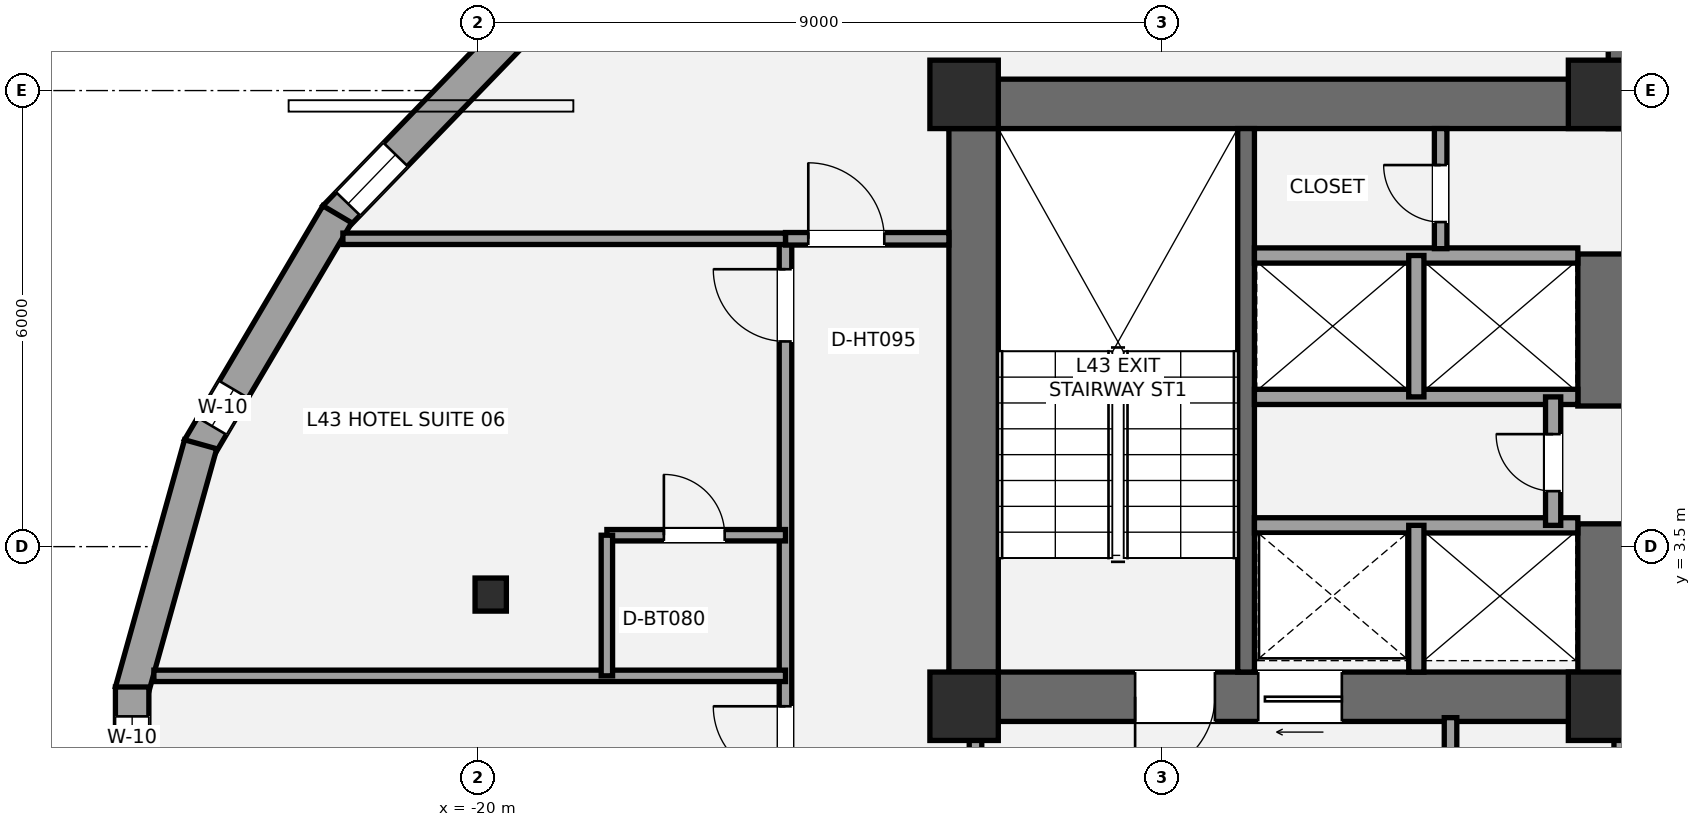
"""IFC4 building model, lengths in metres.
Left out: names, types, materials, properties, quantities, classifications, styles, units other than length and angle.
Written with IfcOpenShell. Run it as: python <this file> out.ifc"""

import sys

from ifc_helpers import new_model, si_unit, direction, frame, frame_2d, origin, origin_2d, place, context, subcontext, project, spatial, rectangle, i_section, extrude, element, fill, save


model = new_model("IFC4")
c1 = context("Model", 3, precision=1e-05, world=origin(), true_north=direction((0.0, 1.0)))
c2 = subcontext(c1, "Body", "Model", "MODEL_VIEW")
j1 = project(units=[si_unit("LENGTHUNIT", "METRE"), si_unit("PLANEANGLEUNIT", "RADIAN")], contexts=[c1])
p1 = place(None, origin())
s1 = spatial("IfcSite", under=j1, at=p1, CompositionType="ELEMENT")
p2 = place(p1, origin())
s2 = spatial("IfcBuilding", under=s1, at=p2, CompositionType="ELEMENT")
p3 = place(p2, frame((0.0, 0.0, 159.8)))
s3 = spatial("IfcBuildingStorey", under=s2, at=p3, CompositionType="ELEMENT", Elevation=159.8)
p4 = place(p3, frame((-13.475, 1.2, 0.0), z_axis=(0.0, 0.0, 1.0), x_axis=(0.0, 1.0, 0.0)))
e1 = element("IfcWall", 1, at=p4, inside=s3, PredefinedType="SHEAR", context=c2, shape_type="SweptSolid", body=[
    extrude(rectangle(XDim=8.45, YDim=0.65, at=frame_2d((4.225, 0.0))), origin(), (0.0, 0.0, 1.0), 3.2),
])
p5 = place(p3, frame((-13.8, 9.325, 0.0), z_axis=(0.0, 0.0, 1.0), x_axis=(1.0, 0.0, 0.0)))
e2 = element("IfcWall", 2, at=p5, inside=s3, PredefinedType="SHEAR", context=c2, shape_type="SweptSolid", body=[
    extrude(rectangle(XDim=9.325, YDim=0.65, at=frame_2d((4.663, 0.0))), origin(), (0.0, 0.0, 1.0), 3.2),
])
p6 = place(p3, frame((-4.875, 1.525, 0.0), z_axis=(0.0, 0.0, 1.0), x_axis=(-1.0, 0.0, 0.0)))
e3 = element("IfcWall", 3, at=p6, inside=s3, PredefinedType="SHEAR", context=c2, shape_type="SweptSolid", body=[
    extrude(rectangle(XDim=8.925, YDim=0.65, at=frame_2d((4.462, 0.0))), origin(), (0.0, 0.0, 1.0), 3.2),
])
p7 = place(p6, frame((5.425, 0.0, 0.0)))
e4 = element("IfcOpeningElement", 4, at=p7, cuts=e3, PredefinedType="OPENING", context=c2, shape_type="SweptSolid", body=[
    extrude(rectangle(XDim=1.05, YDim=2.15, at=frame_2d((0.525, 1.075))), frame((0.0, 0.335, 0.0), z_axis=(0.0, -1.0, 0.0), x_axis=(1.0, 0.0, 0.0)), (0.0, 0.0, 1.0), 0.67),
])
p8 = place(p6, frame((3.755, 0.0, 0.0)))
e5 = element("IfcOpeningElement", 5, at=p8, cuts=e3, PredefinedType="OPENING", context=c2, shape_type="SweptSolid", body=[
    extrude(rectangle(XDim=1.1, YDim=2.2, at=frame_2d((0.55, 1.1))), frame((0.0, 0.335, 0.0), z_axis=(0.0, -1.0, 0.0), x_axis=(1.0, 0.0, 0.0)), (0.0, 0.0, 1.0), 0.67),
])
p9 = place(p3, frame((-5.2, 1.2, 0.0), z_axis=(0.0, 0.0, 1.0), x_axis=(0.0, 1.0, 0.0)))
e6 = element("IfcWall", 6, at=p9, inside=s3, PredefinedType="SHEAR", context=c2, shape_type="SweptSolid", body=[
    extrude(rectangle(XDim=2.6, YDim=0.65, at=frame_2d((1.3, 0.0))), origin(), (0.0, 0.0, 1.0), 3.2),
])
p10 = place(p3, frame((-5.2, 5.35, 0.0), z_axis=(0.0, 0.0, 1.0), x_axis=(0.0, 1.0, 0.0)))
e7 = element("IfcWall", 7, at=p10, inside=s3, PredefinedType="SHEAR", context=c2, shape_type="SweptSolid", body=[
    extrude(rectangle(XDim=2.0, YDim=0.65, at=frame_2d((1.0, 0.0))), origin(), (0.0, 0.0, 1.0), 3.2),
])
p11 = place(p3, frame((-9.89, 1.85, 0.0), z_axis=(0.0, 0.0, 1.0), x_axis=(0.0, 1.0, 0.0)))
e8 = element("IfcWall", 8, at=p11, inside=s3, PredefinedType="SHEAR", context=c2, shape_type="SweptSolid", body=[
    extrude(rectangle(XDim=7.15, YDim=0.22, at=frame_2d((3.575, 0.0))), origin(), (0.0, 0.0, 1.0), 3.2),
])
p12 = place(p3, frame((-4.8, 9.0, 0.0), z_axis=(0.0, 0.0, 1.0), x_axis=(0.0, 1.0, 0.0)))
e9 = element("IfcWall", 9, at=p12, inside=s3, PredefinedType="SHEAR", context=c2, shape_type="SweptSolid", body=[
    extrude(rectangle(XDim=4.05, YDim=0.65, at=frame_2d((2.025, 0.0))), origin(), (0.0, 0.0, 1.0), 3.2),
])
for number, where, z_axis, x_axis in (
    (10, (-13.6, 1.4, 0.0), (0.0, 0.0, 1.0), (1.0, 0.0, 0.0)),
    (11, (-13.6, 9.45, 0.0), (0.0, 0.0, 1.0), (1.0, 0.0, 0.0)),
    (12, (-5.2, 1.4, 0.0), (0.0, 0.0, 1.0), (1.0, 0.0, 0.0)),
    (13, (-5.2, 9.45, 0.0), (0.0, 0.0, 1.0), (1.0, 0.0, 0.0)),
):
    element("IfcColumn", number, at=place(p3, frame(where, z_axis=z_axis, x_axis=x_axis)), inside=s3, PredefinedType="COLUMN", context=c2, shape_type="SweptSolid", body=[
        extrude(rectangle(XDim=0.9, YDim=0.9, at=origin_2d()), origin(), (0.0, 0.0, 1.0), 3.2),
    ])
p13 = place(p3, frame((-19.828, 2.869, 0.0), z_axis=(0.0, 0.0, 1.0), x_axis=(1.0, 0.0, 0.0)))
e14 = element("IfcColumn", 14, at=p13, inside=s3, PredefinedType="COLUMN", context=c2, shape_type="SweptSolid", body=[
    extrude(i_section(OverallWidth=0.412, OverallDepth=0.435, WebThickness=0.036, FlangeThickness=0.057, at=origin_2d()), origin(), (0.0, 0.0, 1.0), 3.2),
])
p14 = place(p3, frame((-21.879, 7.832, 0.0), z_axis=(0.0, 0.0, 1.0), x_axis=(0.694975307772, 0.719033602544, 0.0)))
e15 = element("IfcWall", 15, at=p14, inside=s3, PredefinedType="STANDARD", context=c2, shape_type="SweptSolid", body=[
    extrude(rectangle(XDim=3.866, YDim=0.44, at=frame_2d((1.933, 0.0))), origin(), (0.0, 0.0, 1.0), 2.315),
])
p15 = place(p14, frame((0.25, 0.0, 0.42)))
e16 = element("IfcOpeningElement", 16, at=p15, cuts=e15, PredefinedType="OPENING", context=c2, shape_type="SweptSolid", body=[
    extrude(rectangle(XDim=0.9, YDim=1.35, at=frame_2d((0.45, 0.675))), frame((0.0, 0.23, 0.0), z_axis=(0.0, -1.0, 0.0), x_axis=(1.0, 0.0, 0.0)), (0.0, 0.0, 1.0), 0.46),
])
p16 = place(p3, frame((-23.667, 4.794, 0.0), z_axis=(0.0, 0.0, 1.0), x_axis=(0.508883387051, 0.860835465338, 0.0)))
e17 = element("IfcWall", 17, at=p16, inside=s3, PredefinedType="STANDARD", context=c2, shape_type="SweptSolid", body=[
    extrude(rectangle(XDim=3.577, YDim=0.44, at=frame_2d((1.788, 0.0))), origin(), (0.0, 0.0, 1.0), 2.315),
])
p17 = place(p16, frame((0.339, 0.0, 0.58)))
e18 = element("IfcOpeningElement", 18, at=p17, cuts=e17, PredefinedType="OPENING", context=c2, shape_type="SweptSolid", body=[
    extrude(rectangle(XDim=0.56, YDim=1.15, at=frame_2d((0.28, 0.575))), frame((0.0, 0.23, 0.0), z_axis=(0.0, -1.0, 0.0), x_axis=(1.0, 0.0, 0.0)), (0.0, 0.0, 1.0), 0.46),
])
p18 = place(p3, frame((-24.554, 1.594, 0.0), z_axis=(0.0, 0.0, 1.0), x_axis=(0.269235699479, 0.963074315993, 0.0)))
e19 = element("IfcWall", 19, at=p18, inside=s3, PredefinedType="STANDARD", context=c2, shape_type="SweptSolid", body=[
    extrude(rectangle(XDim=3.377, YDim=0.44, at=frame_2d((1.688, 0.0))), origin(), (0.0, 0.0, 1.0), 2.315),
])
p19 = place(p3, frame((-24.546, -1.654, 0.0), z_axis=(0.0, 0.0, 1.0), x_axis=(0.0, 1.0, 0.0)))
e20 = element("IfcWall", 20, at=p19, inside=s3, PredefinedType="STANDARD", context=c2, shape_type="SweptSolid", body=[
    extrude(rectangle(XDim=3.307, YDim=0.44, at=frame_2d((1.654, 0.0))), origin(), (0.0, 0.0, 1.0), 2.315),
])
p20 = place(p19, frame((2.36, 0.0, 0.58)))
e21 = element("IfcOpeningElement", 21, at=p20, cuts=e20, PredefinedType="OPENING", context=c2, shape_type="SweptSolid", body=[
    extrude(rectangle(XDim=0.56, YDim=1.15, at=frame_2d((0.28, 0.575))), frame((0.0, 0.23, 0.0), z_axis=(0.0, -1.0, 0.0), x_axis=(1.0, 0.0, 0.0)), (0.0, 0.0, 1.0), 0.46),
])
p21 = place(p3, frame((-13.45, -2.15, 0.0), z_axis=(0.0, 0.0, 1.0), x_axis=(0.0, 1.0, 0.0)))
e22 = element("IfcWall", 22, at=p21, inside=s3, PredefinedType="PARTITIONING", context=c2, shape_type="SweptSolid", body=[
    extrude(rectangle(XDim=3.4, YDim=0.165, at=frame_2d((1.7, 0.0))), origin(), (0.0, 0.0, 1.0), 2.473),
])
p22 = place(p21, frame((1.15, 0.0, 0.0)))
e23 = element("IfcOpeningElement", 23, at=p22, cuts=e22, PredefinedType="OPENING", context=c2, shape_type="SweptSolid", body=[
    extrude(rectangle(XDim=1.05, YDim=2.15, at=frame_2d((0.525, 1.075))), frame((0.0, 0.093, 0.0), z_axis=(0.0, -1.0, 0.0), x_axis=(1.0, 0.0, 0.0)), (0.0, 0.0, 1.0), 0.185),
])
p23 = place(p3, frame((-7.2, -2.15, 0.0), z_axis=(0.0, 0.0, 1.0), x_axis=(0.0, 1.0, 0.0)))
e24 = element("IfcWall", 24, at=p23, inside=s3, PredefinedType="PARTITIONING", context=c2, shape_type="SweptSolid", body=[
    extrude(rectangle(XDim=3.4, YDim=0.165, at=frame_2d((1.7, 0.0))), origin(), (0.0, 0.0, 1.0), 2.473),
])
p24 = place(p3, frame((-4.95, -2.15, 0.0), z_axis=(0.0, 0.0, 1.0), x_axis=(0.0, 1.0, 0.0)))
e25 = element("IfcWall", 25, at=p24, inside=s3, PredefinedType="SOLIDWALL", context=c2, shape_type="SweptSolid", body=[
    extrude(rectangle(XDim=3.4, YDim=0.2, at=frame_2d((1.7, 0.0))), origin(), (0.0, 0.0, 1.0), 2.473),
])
p25 = place(p24, frame((0.95, 0.0, 0.0)))
e26 = element("IfcOpeningElement", 26, at=p25, cuts=e25, PredefinedType="OPENING", context=c2, shape_type="SweptSolid", body=[
    extrude(rectangle(XDim=0.75, YDim=2.1, at=frame_2d((0.375, 1.05))), frame((0.0, 0.11, 0.0), z_axis=(0.0, -1.0, 0.0), x_axis=(1.0, 0.0, 0.0)), (0.0, 0.0, 1.0), 0.22),
])
p26 = place(p3, frame((-9.78, 3.78, 0.0), z_axis=(0.0, 0.0, 1.0), x_axis=(1.0, 0.0, 0.0)))
e27 = element("IfcWall", 27, at=p26, inside=s3, PredefinedType="SOLIDWALL", context=c2, shape_type="SweptSolid", body=[
    extrude(rectangle(XDim=4.255, YDim=0.2, at=frame_2d((2.127, 0.0))), origin(), (0.0, 0.0, 1.0), 3.02),
])
p27 = place(p3, frame((-7.65, 1.85, 0.0), z_axis=(0.0, 0.0, 1.0), x_axis=(0.0, 1.0, 0.0)))
e28 = element("IfcWall", 28, at=p27, inside=s3, PredefinedType="SOLIDWALL", context=c2, shape_type="SweptSolid", body=[
    extrude(rectangle(XDim=1.93, YDim=0.2, at=frame_2d((0.965, 0.0))), origin(), (0.0, 0.0, 1.0), 3.02),
])
for number, where, z_axis, x_axis in (
    (29, (-9.78, 5.47, 0.0), (0.0, 0.0, 1.0), (1.0, 0.0, 0.0)),
    (30, (-9.78, 7.33, 0.0), (0.0, 0.0, 1.0), (1.0, 0.0, 0.0)),
):
    element("IfcWall", number, at=place(p3, frame(where, z_axis=z_axis, x_axis=x_axis)), inside=s3, PredefinedType="SOLIDWALL", context=c2, shape_type="SweptSolid", body=[
        extrude(rectangle(XDim=4.255, YDim=0.2, at=frame_2d((2.127, 0.0))), origin(), (0.0, 0.0, 1.0), 3.02),
    ])
p28 = place(p3, frame((-7.65, 5.47, 0.0), z_axis=(0.0, 0.0, 1.0), x_axis=(0.0, 1.0, 0.0)))
e31 = element("IfcWall", 31, at=p28, inside=s3, PredefinedType="SOLIDWALL", context=c2, shape_type="SweptSolid", body=[
    extrude(rectangle(XDim=1.86, YDim=0.2, at=frame_2d((0.93, 0.0))), origin(), (0.0, 0.0, 1.0), 3.02),
])
p29 = place(p3, frame((-5.85, 3.78, 0.0), z_axis=(0.0, 0.0, 1.0), x_axis=(0.0, 1.0, 0.0)))
e32 = element("IfcWall", 32, at=p29, inside=s3, PredefinedType="SOLIDWALL", context=c2, shape_type="SweptSolid", body=[
    extrude(rectangle(XDim=1.69, YDim=0.2, at=frame_2d((0.845, 0.0))), origin(), (0.0, 0.0, 1.0), 3.02),
])
p30 = place(p29, frame((0.45, 0.0, 0.0)))
e33 = element("IfcOpeningElement", 33, at=p30, cuts=e32, PredefinedType="OPENING", context=c2, shape_type="SweptSolid", body=[
    extrude(rectangle(XDim=0.75, YDim=2.1, at=frame_2d((0.375, 1.05))), frame((0.0, 0.11, 0.0), z_axis=(0.0, -1.0, 0.0), x_axis=(1.0, 0.0, 0.0)), (0.0, 0.0, 1.0), 0.22),
])
p31 = place(p3, frame((-7.33, 7.42, 0.0), z_axis=(0.0, 0.0, 1.0), x_axis=(0.0, 1.0, 0.0)))
e34 = element("IfcWall", 34, at=p31, inside=s3, PredefinedType="PARTITIONING", context=c2, shape_type="SweptSolid", body=[
    extrude(rectangle(XDim=1.58, YDim=0.165, at=frame_2d((0.79, 0.0))), origin(), (0.0, 0.0, 1.0), 3.02),
])
p32 = place(p31, frame((0.35, 0.0, 0.0)))
e35 = element("IfcOpeningElement", 35, at=p32, cuts=e34, PredefinedType="OPENING", context=c2, shape_type="SweptSolid", body=[
    extrude(rectangle(XDim=0.75, YDim=2.1, at=frame_2d((0.375, 1.05))), frame((0.0, 0.093, 0.0), z_axis=(0.0, -1.0, 0.0), x_axis=(1.0, 0.0, 0.0)), (0.0, 0.0, 1.0), 0.185),
])
p33 = place(p3, frame((-15.95, -12.528, 0.0), z_axis=(0.0, 0.0, 1.0), x_axis=(0.0, 1.0, 0.0)))
e36 = element("IfcWall", 36, at=p33, inside=s3, PredefinedType="PARTITIONING", context=c2, shape_type="SweptSolid", body=[
    extrude(rectangle(XDim=20.078, YDim=0.165, at=frame_2d((10.039, 0.0))), origin(), (0.0, 0.0, 1.0), 2.473),
])
p34 = place(p33, frame((5.528, 0.0, 0.0)))
e37 = element("IfcOpeningElement", 37, at=p34, cuts=e36, PredefinedType="OPENING", context=c2, shape_type="SweptSolid", body=[
    extrude(rectangle(XDim=0.85, YDim=2.1, at=frame_2d((0.425, 1.05))), frame((0.0, 0.093, 0.0), z_axis=(0.0, -1.0, 0.0), x_axis=(1.0, 0.0, 0.0)), (0.0, 0.0, 1.0), 0.185),
])
p35 = place(p33, frame((12.978, 0.0, 0.0)))
e38 = element("IfcOpeningElement", 38, at=p35, cuts=e36, PredefinedType="OPENING", context=c2, shape_type="SweptSolid", body=[
    extrude(rectangle(XDim=0.95, YDim=2.15, at=frame_2d((0.475, 1.075))), frame((0.0, 0.093, 0.0), z_axis=(0.0, -1.0, 0.0), x_axis=(1.0, 0.0, 0.0)), (0.0, 0.0, 1.0), 0.185),
])
p36 = place(p33, frame((18.728, 0.0, 0.0)))
e39 = element("IfcOpeningElement", 39, at=p36, cuts=e36, PredefinedType="OPENING", context=c2, shape_type="SweptSolid", body=[
    extrude(rectangle(XDim=0.95, YDim=2.15, at=frame_2d((0.475, 1.075))), frame((0.0, 0.093, 0.0), z_axis=(0.0, -1.0, 0.0), x_axis=(1.0, 0.0, 0.0)), (0.0, 0.0, 1.0), 0.185),
])
p37 = place(p3, frame((-15.95, 7.55, 0.0), z_axis=(0.0, 0.0, 1.0), x_axis=(1.0, 0.0, 0.0)))
e40 = element("IfcWall", 40, at=p37, inside=s3, PredefinedType="PARTITIONING", context=c2, shape_type="SweptSolid", body=[
    extrude(rectangle(XDim=2.15, YDim=0.165, at=frame_2d((1.075, 0.0))), origin(), (0.0, 0.0, 1.0), 3.02),
])
p38 = place(p37, frame((0.3, 0.0, 0.0)))
e41 = element("IfcOpeningElement", 41, at=p38, cuts=e40, PredefinedType="OPENING", context=c2, shape_type="SweptSolid", body=[
    extrude(rectangle(XDim=1.0, YDim=2.15, at=frame_2d((0.5, 1.075))), frame((0.0, 0.093, 0.0), z_axis=(0.0, -1.0, 0.0), x_axis=(1.0, 0.0, 0.0)), (0.0, 0.0, 1.0), 0.185),
])
p39 = place(p3, frame((-21.773, 7.55, 0.0), z_axis=(0.0, 0.0, 1.0), x_axis=(1.0, 0.0, 0.0)))
e42 = element("IfcWall", 42, at=p39, inside=s3, PredefinedType="PLUMBINGWALL", context=c2, shape_type="SweptSolid", body=[
    extrude(rectangle(XDim=5.823, YDim=0.15, at=frame_2d((2.912, 0.0))), origin(), (0.0, 0.0, 1.0), 2.473),
])
p40 = place(p3, frame((-24.26, 1.8, 0.0), z_axis=(0.0, 0.0, 1.0), x_axis=(1.0, 0.0, 0.0)))
e43 = element("IfcWall", 43, at=p40, inside=s3, PredefinedType="PLUMBINGWALL", context=c2, shape_type="SweptSolid", body=[
    extrude(rectangle(XDim=8.31, YDim=0.15, at=frame_2d((4.155, 0.0))), origin(), (0.0, 0.0, 1.0), 2.473),
])
p41 = place(p3, frame((-18.3, 3.65, 0.0), z_axis=(0.0, 0.0, 1.0), x_axis=(1.0, 0.0, 0.0)))
e44 = element("IfcWall", 44, at=p41, inside=s3, PredefinedType="PLUMBINGWALL", context=c2, shape_type="SweptSolid", body=[
    extrude(rectangle(XDim=2.35, YDim=0.15, at=frame_2d((1.175, 0.0))), origin(), (0.0, 0.0, 1.0), 3.02),
])
p42 = place(p41, frame((0.75, 0.0, 0.0)))
e45 = element("IfcOpeningElement", 45, at=p42, cuts=e44, PredefinedType="OPENING", context=c2, shape_type="SweptSolid", body=[
    extrude(rectangle(XDim=0.8, YDim=2.1, at=frame_2d((0.4, 1.05))), frame((0.0, 0.085, 0.0), z_axis=(0.0, -1.0, 0.0), x_axis=(1.0, 0.0, 0.0)), (0.0, 0.0, 1.0), 0.17),
])
p43 = place(p3, frame((-18.3, 1.8, 0.0), z_axis=(0.0, 0.0, 1.0), x_axis=(0.0, 1.0, 0.0)))
e46 = element("IfcWall", 46, at=p43, inside=s3, PredefinedType="PLUMBINGWALL", context=c2, shape_type="SweptSolid", body=[
    extrude(rectangle(XDim=1.85, YDim=0.15, at=frame_2d((0.925, 0.0))), origin(), (0.0, 0.0, 1.0), 3.02),
])
p44 = place(p15, origin())
e47 = element("IfcWindow", 47, at=p44, inside=s3, PartitioningType="SINGLE_PANEL", PredefinedType="WINDOW", context=c2, shape_type="SweptSolid", body=[
    extrude(rectangle(XDim=0.9, YDim=1.35, at=frame_2d((0.45, 0.675))), frame((0.0, -0.01, 0.0), z_axis=(0.0, -1.0, 0.0), x_axis=(1.0, 0.0, 0.0)), (0.0, 0.0, 1.0), 0.06),
])
fill(e16, e47)
p45 = place(p20, origin())
e48 = element("IfcWindow", 48, at=p45, inside=s3, PartitioningType="SINGLE_PANEL", PredefinedType="WINDOW", context=c2, shape_type="SweptSolid", body=[
    extrude(rectangle(XDim=0.56, YDim=1.15, at=frame_2d((0.28, 0.575))), frame((0.0, -0.01, 0.0), z_axis=(0.0, -1.0, 0.0), x_axis=(1.0, 0.0, 0.0)), (0.0, 0.0, 1.0), 0.06),
])
fill(e21, e48)
p46 = place(p17, origin())
e49 = element("IfcWindow", 49, at=p46, inside=s3, PartitioningType="SINGLE_PANEL", PredefinedType="WINDOW", context=c2, shape_type="SweptSolid", body=[
    extrude(rectangle(XDim=0.56, YDim=1.15, at=frame_2d((0.28, 0.575))), frame((0.0, -0.01, 0.0), z_axis=(0.0, -1.0, 0.0), x_axis=(1.0, 0.0, 0.0)), (0.0, 0.0, 1.0), 0.06),
])
fill(e18, e49)
p47 = place(p7, origin())
e50 = element("IfcDoor", 50, at=p47, inside=s3, OperationType="SINGLE_SWING_RIGHT", PredefinedType="DOOR", context=c2, shape_type="SweptSolid", body=[
    extrude(rectangle(XDim=1.05, YDim=2.15, at=frame_2d((0.525, 1.075))), frame((0.0, 0.025, 0.0), z_axis=(0.0, -1.0, 0.0), x_axis=(1.0, 0.0, 0.0)), (0.0, 0.0, 1.0), 0.05),
])
fill(e4, e50)
p48 = place(p8, origin())
e51 = element("IfcDoor", 51, at=p48, inside=s3, OperationType="SLIDING_TO_LEFT", PredefinedType="DOOR", context=c2, shape_type="SweptSolid", body=[
    extrude(rectangle(XDim=1.1, YDim=2.2, at=frame_2d((0.55, 1.1))), frame((0.0, 0.025, 0.0), z_axis=(0.0, -1.0, 0.0), x_axis=(1.0, 0.0, 0.0)), (0.0, 0.0, 1.0), 0.05),
])
fill(e5, e51)
p49 = place(p30, origin())
e52 = element("IfcDoor", 52, at=p49, inside=s3, OperationType="SINGLE_SWING_RIGHT", PredefinedType="DOOR", context=c2, shape_type="SweptSolid", body=[
    extrude(rectangle(XDim=0.75, YDim=2.1, at=frame_2d((0.375, 1.05))), frame((0.0, 0.025, 0.0), z_axis=(0.0, -1.0, 0.0), x_axis=(1.0, 0.0, 0.0)), (0.0, 0.0, 1.0), 0.05),
])
fill(e33, e52)
p50 = place(p32, origin())
e53 = element("IfcDoor", 53, at=p50, inside=s3, OperationType="SINGLE_SWING_RIGHT", PredefinedType="DOOR", context=c2, shape_type="SweptSolid", body=[
    extrude(rectangle(XDim=0.75, YDim=2.1, at=frame_2d((0.375, 1.05))), frame((0.0, 0.025, 0.0), z_axis=(0.0, -1.0, 0.0), x_axis=(1.0, 0.0, 0.0)), (0.0, 0.0, 1.0), 0.05),
])
fill(e35, e53)
p51 = place(p38, origin())
e54 = element("IfcDoor", 54, at=p51, inside=s3, OperationType="SINGLE_SWING_LEFT", PredefinedType="DOOR", context=c2, shape_type="SweptSolid", body=[
    extrude(rectangle(XDim=1.0, YDim=2.15, at=frame_2d((0.5, 1.075))), frame((0.0, 0.025, 0.0), z_axis=(0.0, -1.0, 0.0), x_axis=(1.0, 0.0, 0.0)), (0.0, 0.0, 1.0), 0.05),
])
fill(e41, e54)
p52 = place(p35, origin())
e55 = element("IfcDoor", 55, at=p52, inside=s3, OperationType="SINGLE_SWING_RIGHT", PredefinedType="DOOR", context=c2, shape_type="SweptSolid", body=[
    extrude(rectangle(XDim=0.95, YDim=2.15, at=frame_2d((0.475, 1.075))), frame((0.0, 0.025, 0.0), z_axis=(0.0, -1.0, 0.0), x_axis=(1.0, 0.0, 0.0)), (0.0, 0.0, 1.0), 0.05),
])
fill(e38, e55)
p53 = place(p36, origin())
e56 = element("IfcDoor", 56, at=p53, inside=s3, OperationType="SINGLE_SWING_RIGHT", PredefinedType="DOOR", context=c2, shape_type="SweptSolid", body=[
    extrude(rectangle(XDim=0.95, YDim=2.15, at=frame_2d((0.475, 1.075))), frame((0.0, 0.025, 0.0), z_axis=(0.0, -1.0, 0.0), x_axis=(1.0, 0.0, 0.0)), (0.0, 0.0, 1.0), 0.05),
])
fill(e39, e56)
p54 = place(p42, origin())
e57 = element("IfcDoor", 57, at=p54, inside=s3, OperationType="SINGLE_SWING_LEFT", PredefinedType="DOOR", context=c2, shape_type="SweptSolid", body=[
    extrude(rectangle(XDim=0.8, YDim=2.1, at=frame_2d((0.4, 1.05))), frame((0.0, 0.025, 0.0), z_axis=(0.0, -1.0, 0.0), x_axis=(1.0, 0.0, 0.0)), (0.0, 0.0, 1.0), 0.05),
])
fill(e45, e57)
save(model, sys.argv[1])
